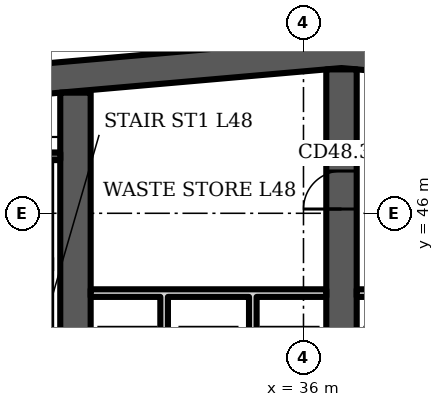
"""IFC4 building model, lengths in metres.
Left out: names, types, materials, properties, quantities, classifications, styles, units other than length and angle.
Written with IfcOpenShell. Run it as: python <this file> out.ifc"""

import sys

from ifc_helpers import new_model, si_unit, direction, frame, frame_2d, origin, place, context, subcontext, project, spatial, polyline, rectangle, outline, extrude, element, fill, save


model = new_model("IFC4")
c1 = context("Model", 3, precision=1e-05, world=origin(), true_north=direction((0.0, 1.0)))
c2 = subcontext(c1, "Body", "Model", "MODEL_VIEW")
j1 = project(units=[si_unit("LENGTHUNIT", "METRE"), si_unit("PLANEANGLEUNIT", "RADIAN")], contexts=[c1])
p1 = place(None, origin())
s1 = spatial("IfcSite", under=j1, at=p1, CompositionType="ELEMENT")
p2 = place(p1, origin())
s2 = spatial("IfcBuilding", under=s1, at=p2, CompositionType="ELEMENT")
p3 = place(p2, frame((0.0, 0.0, 195.1)))
s3 = spatial("IfcBuildingStorey", under=s2, at=p3, CompositionType="ELEMENT", Elevation=195.1)
p4 = place(p3, frame((0.0, 0.0, -0.0)))
e1 = element("IfcWall", 1, at=p4, inside=s3, PredefinedType="SHEAR", context=c2, shape_type="SweptSolid", body=[
    extrude(outline(polyline([(16.0, 47.984), (37.0, 49.822), (58.0, 47.984), (58.0, 48.787), (37.0, 50.625), (16.0, 48.787), (16.0, 47.984)])), origin(), (0.0, 0.0, 1.0), 3.6),
])
p5 = place(p3, frame((30.0, 34.8, 0.0), z_axis=(0.0, 0.0, 1.0), x_axis=(0.0, 1.0, 0.0)))
e2 = element("IfcWall", 2, at=p5, inside=s3, PredefinedType="SHEAR", context=c2, shape_type="SweptSolid", body=[
    extrude(rectangle(XDim=14.374, YDim=0.8, at=frame_2d((7.187, 0.0))), origin(), (0.0, 0.0, 1.0), 3.6),
])
p6 = place(p5, frame((3.6, 0.0, 0.0)))
e3 = element("IfcOpeningElement", 3, at=p6, cuts=e2, PredefinedType="OPENING", context=c2, shape_type="SweptSolid", body=[
    extrude(rectangle(XDim=1.1, YDim=2.1, at=frame_2d((0.55, 1.05))), frame((0.0, 0.41, 0.0), z_axis=(0.0, -1.0, 0.0), x_axis=(1.0, 0.0, 0.0)), (0.0, 0.0, 1.0), 0.82),
])
p7 = place(p3, frame((37.0, 34.8, 0.0), z_axis=(0.0, 0.0, 1.0), x_axis=(0.0, 1.0, 0.0)))
e4 = element("IfcWall", 4, at=p7, inside=s3, PredefinedType="SHEAR", context=c2, shape_type="SweptSolid", body=[
    extrude(rectangle(XDim=14.987, YDim=0.8, at=frame_2d((7.493, 0.0))), origin(), (0.0, 0.0, 1.0), 3.6),
])
p8 = place(p7, frame((11.312, 0.0, 0.0)))
e5 = element("IfcOpeningElement", 5, at=p8, cuts=e4, PredefinedType="OPENING", context=c2, shape_type="SweptSolid", body=[
    extrude(rectangle(XDim=1.0, YDim=2.1, at=frame_2d((0.5, 1.05))), frame((0.0, 0.41, 0.0), z_axis=(0.0, -1.0, 0.0), x_axis=(1.0, 0.0, 0.0)), (0.0, 0.0, 1.0), 0.82),
])
p9 = place(p7, frame((3.6, 0.0, 0.0)))
e6 = element("IfcOpeningElement", 6, at=p9, cuts=e4, PredefinedType="OPENING", context=c2, shape_type="SweptSolid", body=[
    extrude(rectangle(XDim=1.1, YDim=2.1, at=frame_2d((0.55, 1.05))), frame((0.0, 0.41, 0.0), z_axis=(0.0, -1.0, 0.0), x_axis=(1.0, 0.0, 0.0)), (0.0, 0.0, 1.0), 0.82),
])
p10 = place(p3, frame((25.75, 47.5, 0.0), z_axis=(0.0, 0.0, 1.0), x_axis=(1.0, 0.0, 0.0)))
e7 = element("IfcWall", 7, at=p10, inside=s3, PredefinedType="SHEAR", context=c2, shape_type="SweptSolid", body=[
    extrude(rectangle(XDim=3.85, YDim=0.2, at=frame_2d((1.925, 0.0))), origin(), (0.0, 0.0, 1.0), 3.2),
])
p11 = place(p3, frame((0.0, 0.0, -0.0)))
e8 = element("IfcWall", 8, at=p11, inside=s3, PredefinedType="PARTITIONING", context=c2, shape_type="SweptSolid", body=[
    extrude(outline(polyline([(32.433, 40.8), (32.233, 40.8), (32.233, 43.8), (30.4, 43.8), (30.4, 44.0), (36.6, 44.0), (36.6, 43.8), (34.767, 43.8), (34.767, 40.8), (34.567, 40.8), (34.567, 43.8), (32.433, 43.8), (32.433, 40.8)])), origin(), (0.0, 0.0, 1.0), 3.2),
])
p12 = place(p3, frame((0.0, 0.0, -0.0)))
e9 = element("IfcWall", 9, at=p12, inside=s3, PredefinedType="PARTITIONING", context=c2, shape_type="SweptSolid", body=[
    extrude(outline(polyline([(39.433, 40.8), (39.233, 40.8), (39.233, 43.8), (37.4, 43.8), (37.4, 44.0), (43.6, 44.0), (43.6, 43.8), (41.767, 43.8), (41.767, 40.8), (41.567, 40.8), (41.567, 43.8), (39.433, 43.8), (39.433, 40.8)])), origin(), (0.0, 0.0, 1.0), 3.2),
])
p13 = place(p8, origin())
e10 = element("IfcDoor", 10, at=p13, inside=s3, OperationType="SINGLE_SWING_LEFT", PredefinedType="DOOR", context=c2, shape_type="SweptSolid", body=[
    extrude(rectangle(XDim=1.0, YDim=2.1, at=frame_2d((0.5, 1.05))), frame((0.0, 0.4, 0.0), z_axis=(0.0, -1.0, 0.0), x_axis=(1.0, 0.0, 0.0)), (0.0, 0.0, 1.0), 0.8),
])
fill(e5, e10)
save(model, sys.argv[1])
